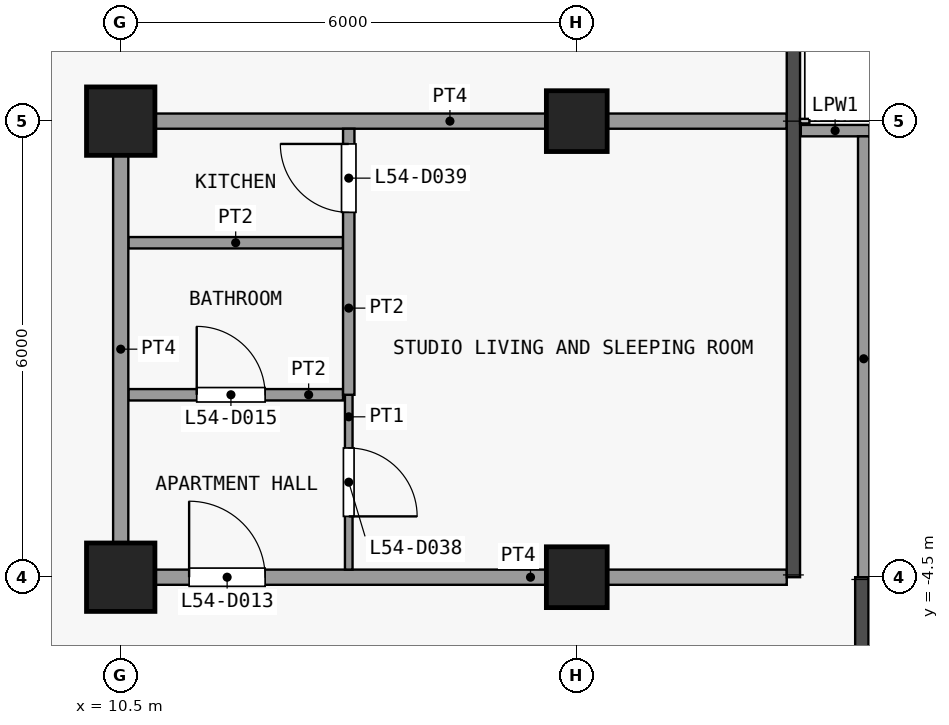
"""IFC4 building model, lengths in metres.
Left out: names, types, materials, properties, quantities, classifications, styles, units other than length and angle.
Written with IfcOpenShell. Run it as: python <this file> out.ifc"""

import sys

from ifc_helpers import new_model, si_unit, direction, frame, frame_2d, origin, origin_2d, place, context, subcontext, project, spatial, rectangle, extrude, element, fill, save


model = new_model("IFC4")
c1 = context("Model", 3, precision=1e-05, world=origin(), true_north=direction((0.0, 1.0)))
c2 = subcontext(c1, "Body", "Model", "MODEL_VIEW")
j1 = project(units=[si_unit("LENGTHUNIT", "METRE"), si_unit("PLANEANGLEUNIT", "RADIAN")], contexts=[c1])
p1 = place(None, origin())
s1 = spatial("IfcSite", under=j1, at=p1, CompositionType="ELEMENT")
p2 = place(p1, origin())
s2 = spatial("IfcBuilding", under=s1, at=p2, CompositionType="ELEMENT")
p3 = place(p2, frame((0.0, 0.0, 215.9)))
s3 = spatial("IfcBuildingStorey", under=s2, at=p3, CompositionType="ELEMENT", Elevation=215.9)
for number, where, z_axis, x_axis in (
    (1, (10.5, -4.5, 0.0), (0.0, 0.0, 1.0), (1.0, 0.0, 0.0)),
    (2, (10.5, 1.5, 0.0), (0.0, 0.0, 1.0), (1.0, 0.0, 0.0)),
):
    element("IfcColumn", number, at=place(p3, frame(where, z_axis=z_axis, x_axis=x_axis)), inside=s3, PredefinedType="COLUMN", context=c2, shape_type="SweptSolid", body=[
        extrude(rectangle(XDim=0.9, YDim=0.9, at=origin_2d()), origin(), (0.0, 0.0, 1.0), 3.6),
    ])
for number, where, z_axis, x_axis in (
    (3, (16.5, -4.5, 0.0), (0.0, 0.0, 1.0), (1.0, 0.0, 0.0)),
    (4, (16.5, 1.5, 0.0), (0.0, 0.0, 1.0), (1.0, 0.0, 0.0)),
):
    element("IfcColumn", number, at=place(p3, frame(where, z_axis=z_axis, x_axis=x_axis)), inside=s3, PredefinedType="COLUMN", context=c2, shape_type="SweptSolid", body=[
        extrude(rectangle(XDim=0.8, YDim=0.8, at=origin_2d()), origin(), (0.0, 0.0, 1.0), 3.6),
    ])
p4 = place(p3, frame((19.448, 1.375, 0.0), z_axis=(0.0, 0.0, 1.0), x_axis=(1.0, 0.0, 0.0)))
e5 = element("IfcWall", 5, at=p4, inside=s3, PredefinedType="PARAPET", context=c2, shape_type="SweptSolid", body=[
    extrude(rectangle(XDim=0.903, YDim=0.15, at=frame_2d((0.451, 0.0))), origin(), (0.0, 0.0, 1.0), 1.15),
])
p5 = place(p3, frame((20.275, 1.3, 0.0), z_axis=(0.0, 0.0, 1.0), x_axis=(0.0, -1.0, 0.0)))
e6 = element("IfcWall", 6, at=p5, inside=s3, PredefinedType="PARAPET", context=c2, shape_type="SweptSolid", body=[
    extrude(rectangle(XDim=5.853, YDim=0.15, at=frame_2d((2.926, 0.0))), origin(), (0.0, 0.0, 1.0), 1.15),
])
p6 = place(p3, frame((10.4, -4.5, 0.0), z_axis=(0.0, 0.0, 1.0), x_axis=(1.0, 0.0, 0.0)))
e7 = element("IfcWall", 7, at=p6, inside=s3, PredefinedType="PARTITIONING", context=c2, shape_type="SweptSolid", body=[
    extrude(rectangle(XDim=8.863, YDim=0.2, at=frame_2d((4.431, 0.0))), origin(), (0.0, 0.0, 1.0), 3.3),
])
p7 = place(p6, frame((1.0, 0.0, 0.0)))
e8 = element("IfcOpeningElement", 8, at=p7, cuts=e7, PredefinedType="OPENING", context=c2, shape_type="SweptSolid", body=[
    extrude(rectangle(XDim=1.0, YDim=2.1, at=frame_2d((0.5, 1.05))), frame((0.0, 0.11, 0.0), z_axis=(0.0, -1.0, 0.0), x_axis=(1.0, 0.0, 0.0)), (0.0, 0.0, 1.0), 0.22),
])
p8 = place(p3, frame((10.6, -2.1, 0.0), z_axis=(0.0, 0.0, 1.0), x_axis=(1.0, 0.0, 0.0)))
e9 = element("IfcWall", 9, at=p8, inside=s3, PredefinedType="PARTITIONING", context=c2, shape_type="SweptSolid", body=[
    extrude(rectangle(XDim=2.825, YDim=0.15, at=frame_2d((1.413, 0.0))), origin(), (0.0, 0.0, 1.0), 3.3),
])
p9 = place(p8, frame((0.9, 0.0, 0.0)))
e10 = element("IfcOpeningElement", 10, at=p9, cuts=e9, PredefinedType="OPENING", context=c2, shape_type="SweptSolid", body=[
    extrude(rectangle(XDim=0.9, YDim=2.1, at=frame_2d((0.45, 1.05))), frame((0.0, 0.085, 0.0), z_axis=(0.0, -1.0, 0.0), x_axis=(1.0, 0.0, 0.0)), (0.0, 0.0, 1.0), 0.17),
])
p10 = place(p3, frame((10.6, -0.1, 0.0), z_axis=(0.0, 0.0, 1.0), x_axis=(1.0, 0.0, 0.0)))
e11 = element("IfcWall", 11, at=p10, inside=s3, PredefinedType="PARTITIONING", context=c2, shape_type="SweptSolid", body=[
    extrude(rectangle(XDim=2.825, YDim=0.15, at=frame_2d((1.413, 0.0))), origin(), (0.0, 0.0, 1.0), 3.3),
])
p11 = place(p3, frame((10.4, 1.5, 0.0), z_axis=(0.0, 0.0, 1.0), x_axis=(1.0, 0.0, 0.0)))
e12 = element("IfcWall", 12, at=p11, inside=s3, PredefinedType="PARTITIONING", context=c2, shape_type="SweptSolid", body=[
    extrude(rectangle(XDim=8.863, YDim=0.2, at=frame_2d((4.431, 0.0))), origin(), (0.0, 0.0, 1.0), 3.3),
])
p12 = place(p3, frame((10.5, -4.4, 0.0), z_axis=(0.0, 0.0, 1.0), x_axis=(0.0, 1.0, 0.0)))
e13 = element("IfcWall", 13, at=p12, inside=s3, PredefinedType="PARTITIONING", context=c2, shape_type="SweptSolid", body=[
    extrude(rectangle(XDim=5.8, YDim=0.2, at=frame_2d((2.9, 0.0))), origin(), (0.0, 0.0, 1.0), 3.3),
])
p13 = place(p3, frame((13.5, -4.4, 0.0), z_axis=(0.0, 0.0, 1.0), x_axis=(0.0, 1.0, 0.0)))
e14 = element("IfcWall", 14, at=p13, inside=s3, PredefinedType="PARTITIONING", context=c2, shape_type="SweptSolid", body=[
    extrude(rectangle(XDim=2.3, YDim=0.1, at=frame_2d((1.15, 0.0))), origin(), (0.0, 0.0, 1.0), 3.3),
])
p14 = place(p13, frame((0.7, 0.0, 0.0)))
e15 = element("IfcOpeningElement", 15, at=p14, cuts=e14, PredefinedType="OPENING", context=c2, shape_type="SweptSolid", body=[
    extrude(rectangle(XDim=0.9, YDim=2.1, at=frame_2d((0.45, 1.05))), frame((0.0, 0.06, 0.0), z_axis=(0.0, -1.0, 0.0), x_axis=(1.0, 0.0, 0.0)), (0.0, 0.0, 1.0), 0.12),
])
p15 = place(p3, frame((13.5, -2.1, 0.0), z_axis=(0.0, 0.0, 1.0), x_axis=(0.0, 1.0, 0.0)))
e16 = element("IfcWall", 16, at=p15, inside=s3, PredefinedType="PARTITIONING", context=c2, shape_type="SweptSolid", body=[
    extrude(rectangle(XDim=3.5, YDim=0.15, at=frame_2d((1.75, 0.0))), origin(), (0.0, 0.0, 1.0), 3.3),
])
p16 = place(p15, frame((2.4, 0.0, 0.0)))
e17 = element("IfcOpeningElement", 17, at=p16, cuts=e16, PredefinedType="OPENING", context=c2, shape_type="SweptSolid", body=[
    extrude(rectangle(XDim=0.9, YDim=2.1, at=frame_2d((0.45, 1.05))), frame((0.0, 0.085, 0.0), z_axis=(0.0, -1.0, 0.0), x_axis=(1.0, 0.0, 0.0)), (0.0, 0.0, 1.0), 0.17),
])
p17 = place(p7, origin())
e18 = element("IfcDoor", 18, at=p17, inside=s3, OperationType="SINGLE_SWING_RIGHT", PredefinedType="DOOR", context=c2, shape_type="SweptSolid", body=[
    extrude(rectangle(XDim=1.0, YDim=2.1, at=frame_2d((0.5, 1.05))), frame((0.0, 0.025, 0.0), z_axis=(0.0, -1.0, 0.0), x_axis=(1.0, 0.0, 0.0)), (0.0, 0.0, 1.0), 0.05),
])
fill(e8, e18)
p18 = place(p9, origin())
e19 = element("IfcDoor", 19, at=p18, inside=s3, OperationType="SINGLE_SWING_RIGHT", PredefinedType="DOOR", context=c2, shape_type="SweptSolid", body=[
    extrude(rectangle(XDim=0.9, YDim=2.1, at=frame_2d((0.45, 1.05))), frame((0.0, 0.025, 0.0), z_axis=(0.0, -1.0, 0.0), x_axis=(1.0, 0.0, 0.0)), (0.0, 0.0, 1.0), 0.05),
])
fill(e10, e19)
p19 = place(p14, origin())
e20 = element("IfcDoor", 20, at=p19, inside=s3, OperationType="SINGLE_SWING_LEFT", PredefinedType="DOOR", context=c2, shape_type="SweptSolid", body=[
    extrude(rectangle(XDim=0.9, YDim=2.1, at=frame_2d((0.45, 1.05))), frame((0.0, 0.025, 0.0), z_axis=(0.0, -1.0, 0.0), x_axis=(1.0, 0.0, 0.0)), (0.0, 0.0, 1.0), 0.05),
])
fill(e15, e20)
p20 = place(p16, origin())
e21 = element("IfcDoor", 21, at=p20, inside=s3, OperationType="SINGLE_SWING_LEFT", PredefinedType="DOOR", context=c2, shape_type="SweptSolid", body=[
    extrude(rectangle(XDim=0.9, YDim=2.1, at=frame_2d((0.45, 1.05))), frame((0.0, 0.025, 0.0), z_axis=(0.0, -1.0, 0.0), x_axis=(1.0, 0.0, 0.0)), (0.0, 0.0, 1.0), 0.05),
])
fill(e17, e21)
save(model, sys.argv[1])
